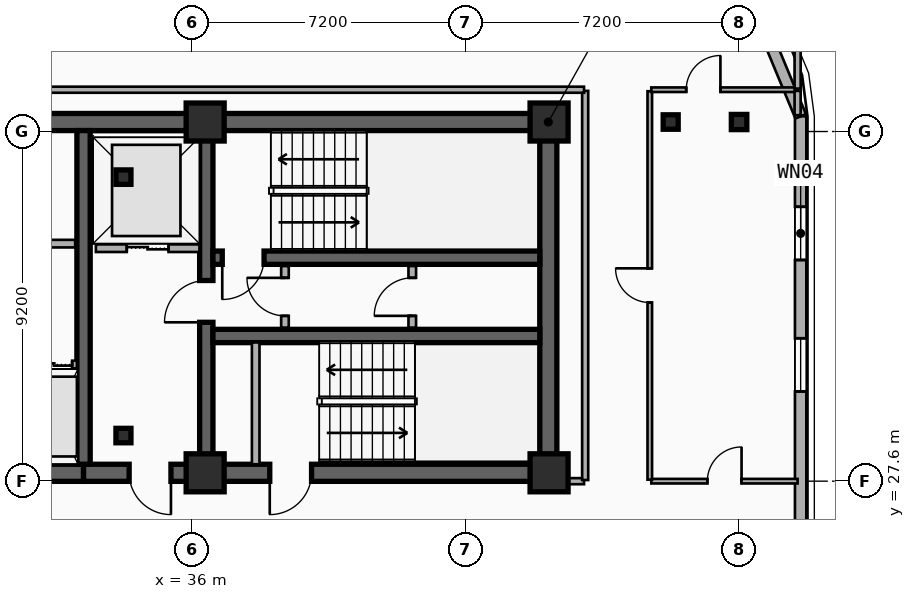
"""IFC4 building model, lengths in metres.
Left out: names, types, materials, properties, quantities, classifications, styles, units other than length and angle.
Written with IfcOpenShell. Run it as: python <this file> out.ifc"""

import sys

from ifc_helpers import new_model, si_unit, direction, frame, frame_2d, origin, origin_2d, place, context, subcontext, project, spatial, rectangle, i_section, extrude, element, fill, save


model = new_model("IFC4")
c1 = context("Model", 3, precision=1e-05, world=origin(), true_north=direction((0.0, 1.0)))
c2 = subcontext(c1, "Body", "Model", "MODEL_VIEW")
j1 = project(units=[si_unit("LENGTHUNIT", "METRE"), si_unit("PLANEANGLEUNIT", "RADIAN")], contexts=[c1])
p1 = place(None, origin())
s1 = spatial("IfcSite", under=j1, at=p1, CompositionType="ELEMENT")
p2 = place(p1, origin())
s2 = spatial("IfcBuilding", under=s1, at=p2, CompositionType="ELEMENT")
p3 = place(p2, frame((0.0, 0.0, 240.0)))
s3 = spatial("IfcBuildingStorey", under=s2, at=p3, CompositionType="ELEMENT", Elevation=240.0)
p4 = place(p3, frame((12.15, 37.05, 0.0), z_axis=(0.0, 0.0, 1.0), x_axis=(1.0, 0.0, 0.0)))
e1 = element("IfcWall", 1, at=p4, inside=s3, PredefinedType="SHEAR", context=c2, shape_type="SweptSolid", body=[
    extrude(rectangle(XDim=33.23, YDim=0.45, at=frame_2d((16.615, 0.0))), origin(), (0.0, 0.0, 1.0), 3.6),
])
p5 = place(p3, frame((33.15, 27.82, 0.0), z_axis=(0.0, 0.0, 1.0), x_axis=(-1.0, 0.0, 0.0)))
e2 = element("IfcWall", 2, at=p5, inside=s3, PredefinedType="SHEAR", context=c2, shape_type="SweptSolid", body=[
    extrude(rectangle(XDim=11.97, YDim=0.45, at=frame_2d((5.985, 0.0))), origin(), (0.0, 0.0, 1.0), 3.6),
])
p6 = place(p5, frame((6.1, 0.0, 0.0)))
e3 = element("IfcOpeningElement", 3, at=p6, cuts=e2, PredefinedType="OPENING", context=c2, shape_type="SweptSolid", body=[
    extrude(rectangle(XDim=1.6, YDim=2.2, at=frame_2d((0.8, 1.1))), frame((0.0, 0.235, 0.0), z_axis=(0.0, -1.0, 0.0), x_axis=(1.0, 0.0, 0.0)), (0.0, 0.0, 1.0), 0.47),
])
p7 = place(p3, frame((45.38, 27.82, 0.0), z_axis=(0.0, 0.0, 1.0), x_axis=(-1.0, 0.0, 0.0)))
e4 = element("IfcWall", 4, at=p7, inside=s3, PredefinedType="SHEAR", context=c2, shape_type="SweptSolid", body=[
    extrude(rectangle(XDim=12.23, YDim=0.45, at=frame_2d((6.115, 0.0))), origin(), (0.0, 0.0, 1.0), 3.6),
])
p8 = place(p7, frame((9.93, 0.0, 0.0)))
e5 = element("IfcOpeningElement", 5, at=p8, cuts=e4, PredefinedType="OPENING", context=c2, shape_type="SweptSolid", body=[
    extrude(rectangle(XDim=1.1, YDim=2.15, at=frame_2d((0.55, 1.075))), frame((0.0, 0.235, 0.0), z_axis=(0.0, -1.0, 0.0), x_axis=(1.0, 0.0, 0.0)), (0.0, 0.0, 1.0), 0.47),
])
p9 = place(p7, frame((6.23, 0.0, 0.0)))
e6 = element("IfcOpeningElement", 6, at=p9, cuts=e4, PredefinedType="OPENING", context=c2, shape_type="SweptSolid", body=[
    extrude(rectangle(XDim=1.1, YDim=2.15, at=frame_2d((0.55, 1.075))), frame((0.0, 0.235, 0.0), z_axis=(0.0, -1.0, 0.0), x_axis=(1.0, 0.0, 0.0)), (0.0, 0.0, 1.0), 0.47),
])
p10 = place(p3, frame((45.38, 28.045, 0.0), z_axis=(0.0, 0.0, 1.0), x_axis=(0.0, 1.0, 0.0)))
e7 = element("IfcWall", 7, at=p10, inside=s3, PredefinedType="SHEAR", context=c2, shape_type="SweptSolid", body=[
    extrude(rectangle(XDim=8.78, YDim=0.45, at=frame_2d((4.39, 0.0))), origin(), (0.0, 0.0, 1.0), 3.6),
])
p11 = place(p3, frame((33.15, 28.045, 0.0), z_axis=(0.0, 0.0, 1.0), x_axis=(0.0, 1.0, 0.0)))
e8 = element("IfcWall", 8, at=p11, inside=s3, PredefinedType="SHEAR", context=c2, shape_type="SweptSolid", body=[
    extrude(rectangle(XDim=8.78, YDim=0.35, at=frame_2d((4.39, 0.0))), origin(), (0.0, 0.0, 1.0), 3.6),
])
p12 = place(p3, frame((36.38, 28.045, 0.0), z_axis=(0.0, 0.0, 1.0), x_axis=(0.0, 1.0, 0.0)))
e9 = element("IfcWall", 9, at=p12, inside=s3, PredefinedType="SHEAR", context=c2, shape_type="SweptSolid", body=[
    extrude(rectangle(XDim=8.78, YDim=0.35, at=frame_2d((4.39, 0.0))), origin(), (0.0, 0.0, 1.0), 3.6),
])
p13 = place(p12, frame((3.735, 0.0, 0.0)))
e10 = element("IfcOpeningElement", 10, at=p13, cuts=e9, PredefinedType="OPENING", context=c2, shape_type="SweptSolid", body=[
    extrude(rectangle(XDim=1.1, YDim=2.15, at=frame_2d((0.55, 1.075))), frame((0.0, 0.185, 0.0), z_axis=(0.0, -1.0, 0.0), x_axis=(1.0, 0.0, 0.0)), (0.0, 0.0, 1.0), 0.37),
])
p14 = place(p3, frame((45.155, 33.48, 0.0), z_axis=(0.0, 0.0, 1.0), x_axis=(-1.0, 0.0, 0.0)))
e11 = element("IfcWall", 11, at=p14, inside=s3, PredefinedType="SHEAR", context=c2, shape_type="SweptSolid", body=[
    extrude(rectangle(XDim=8.6, YDim=0.35, at=frame_2d((4.3, 0.0))), origin(), (0.0, 0.0, 1.0), 3.6),
])
p15 = place(p14, frame((7.255, 0.0, 0.0)))
e12 = element("IfcOpeningElement", 12, at=p15, cuts=e11, PredefinedType="OPENING", context=c2, shape_type="SweptSolid", body=[
    extrude(rectangle(XDim=1.1, YDim=2.15, at=frame_2d((0.55, 1.075))), frame((0.0, 0.185, 0.0), z_axis=(0.0, -1.0, 0.0), x_axis=(1.0, 0.0, 0.0)), (0.0, 0.0, 1.0), 0.37),
])
p16 = place(p3, frame((36.555, 31.42, 0.0), z_axis=(0.0, 0.0, 1.0), x_axis=(1.0, 0.0, 0.0)))
e13 = element("IfcWall", 13, at=p16, inside=s3, PredefinedType="SHEAR", context=c2, shape_type="SweptSolid", body=[
    extrude(rectangle(XDim=8.6, YDim=0.35, at=frame_2d((4.3, 0.0))), origin(), (0.0, 0.0, 1.0), 3.6),
])
for number, where, z_axis, x_axis in (
    (14, (34.2, 28.8, 0.0), (0.0, 0.0, 1.0), (1.0, 0.0, 0.0)),
    (15, (34.2, 35.6, 0.0), (0.0, 0.0, 1.0), (1.0, 0.0, 0.0)),
):
    element("IfcColumn", number, at=place(p3, frame(where, z_axis=z_axis, x_axis=x_axis)), inside=s3, PredefinedType="COLUMN", context=c2, shape_type="SweptSolid", body=[
        extrude(i_section(OverallWidth=0.395, OverallDepth=0.38, WebThickness=0.019, FlangeThickness=0.03, FilletRadius=0.015, at=origin_2d()), origin(), (0.0, 0.0, 1.0), 3.6),
    ])
for number, where, z_axis, x_axis in (
    (16, (36.35, 27.82, 0.0), (0.0, 0.0, 1.0), (1.0, 0.0, 0.0)),
    (17, (36.35, 37.05, 0.0), (0.0, 0.0, 1.0), (1.0, 0.0, 0.0)),
    (18, (45.4, 27.82, 0.0), (0.0, 0.0, 1.0), (1.0, 0.0, 0.0)),
    (19, (45.4, 37.05, 0.0), (0.0, 0.0, 1.0), (1.0, 0.0, 0.0)),
):
    element("IfcColumn", number, at=place(p3, frame(where, z_axis=z_axis, x_axis=x_axis)), inside=s3, PredefinedType="COLUMN", context=c2, shape_type="SweptSolid", body=[
        extrude(rectangle(XDim=1.0, YDim=1.0, at=origin_2d()), origin(), (0.0, 0.0, 1.0), 3.6),
    ])
p17 = place(p3, frame((48.6, 37.05, 0.0), z_axis=(0.0, 0.0, 1.0), x_axis=(1.0, 0.0, 0.0)))
e20 = element("IfcColumn", 20, at=p17, inside=s3, PredefinedType="COLUMN", context=c2, shape_type="SweptSolid", body=[
    extrude(i_section(OverallWidth=0.395, OverallDepth=0.38, WebThickness=0.019, FlangeThickness=0.03, FilletRadius=0.015, at=origin_2d()), origin(), (0.0, 0.0, 1.0), 3.6),
])
p18 = place(p3, frame((50.4, 37.05, 0.0), z_axis=(0.0, 0.0, 1.0), x_axis=(1.0, 0.0, 0.0)))
e21 = element("IfcColumn", 21, at=p18, inside=s3, PredefinedType="COLUMN", context=c2, shape_type="SweptSolid", body=[
    extrude(i_section(OverallWidth=0.408, OverallDepth=0.4, WebThickness=0.025, FlangeThickness=0.039, FilletRadius=0.015, at=origin_2d()), origin(), (0.0, 0.0, 1.0), 3.6),
])
p19 = place(p3, frame((52.02, 37.2, 0.0), z_axis=(0.0, 0.0, 1.0), x_axis=(0.0, -1.0, 0.0)))
e22 = element("IfcWall", 22, at=p19, inside=s3, PredefinedType="SOLIDWALL", context=c2, shape_type="SweptSolid", body=[
    extrude(rectangle(XDim=28.6, YDim=0.3, at=frame_2d((14.3, 0.0))), origin(), (0.0, 0.0, 1.0), 3.28),
])
p20 = place(p19, frame((2.38, 0.0, 0.34)))
e23 = element("IfcOpeningElement", 23, at=p20, cuts=e22, PredefinedType="OPENING", context=c2, shape_type="SweptSolid", body=[
    extrude(rectangle(XDim=1.4, YDim=2.1, at=frame_2d((0.7, 1.05))), frame((0.0, 0.16, 0.0), z_axis=(0.0, -1.0, 0.0), x_axis=(1.0, 0.0, 0.0)), (0.0, 0.0, 1.0), 0.32),
])
p21 = place(p19, frame((5.84, 0.0, 0.34)))
e24 = element("IfcOpeningElement", 24, at=p21, cuts=e22, PredefinedType="OPENING", context=c2, shape_type="SweptSolid", body=[
    extrude(rectangle(XDim=1.4, YDim=2.1, at=frame_2d((0.7, 1.05))), frame((0.0, 0.16, 0.0), z_axis=(0.0, -1.0, 0.0), x_axis=(1.0, 0.0, 0.0)), (0.0, 0.0, 1.0), 0.32),
])
p22 = place(p19, frame((24.529, 0.0, 0.34)))
e25 = element("IfcOpeningElement", 25, at=p22, cuts=e22, PredefinedType="OPENING", context=c2, shape_type="SweptSolid", body=[
    extrude(rectangle(XDim=1.4, YDim=2.1, at=frame_2d((0.7, 1.05))), frame((0.0, 0.16, 0.0), z_axis=(0.0, -1.0, 0.0), x_axis=(1.0, 0.0, 0.0)), (0.0, 0.0, 1.0), 0.32),
])
p23 = place(p19, frame((20.521, 0.0, 0.34)))
e26 = element("IfcOpeningElement", 26, at=p23, cuts=e22, PredefinedType="OPENING", context=c2, shape_type="SweptSolid", body=[
    extrude(rectangle(XDim=1.4, YDim=2.1, at=frame_2d((0.7, 1.05))), frame((0.0, 0.16, 0.0), z_axis=(0.0, -1.0, 0.0), x_axis=(1.0, 0.0, 0.0)), (0.0, 0.0, 1.0), 0.32),
])
p24 = place(p19, frame((16.733, 0.0, 0.34)))
e27 = element("IfcOpeningElement", 27, at=p24, cuts=e22, PredefinedType="OPENING", context=c2, shape_type="SweptSolid", body=[
    extrude(rectangle(XDim=1.4, YDim=2.1, at=frame_2d((0.7, 1.05))), frame((0.0, 0.16, 0.0), z_axis=(0.0, -1.0, 0.0), x_axis=(1.0, 0.0, 0.0)), (0.0, 0.0, 1.0), 0.32),
])
p25 = place(p19, frame((12.945, 0.0, 0.34)))
e28 = element("IfcOpeningElement", 28, at=p25, cuts=e22, PredefinedType="OPENING", context=c2, shape_type="SweptSolid", body=[
    extrude(rectangle(XDim=1.4, YDim=2.1, at=frame_2d((0.7, 1.05))), frame((0.0, 0.16, 0.0), z_axis=(0.0, -1.0, 0.0), x_axis=(1.0, 0.0, 0.0)), (0.0, 0.0, 1.0), 0.32),
])
p26 = place(p3, frame((50.843, 40.042, 0.0), z_axis=(0.0, 0.0, 1.0), x_axis=(0.382704529509, -0.923870793506, 0.0)))
e29 = element("IfcWall", 29, at=p26, inside=s3, PredefinedType="SOLIDWALL", context=c2, shape_type="SweptSolid", body=[
    extrude(rectangle(XDim=3.077, YDim=0.3, at=frame_2d((1.538, 0.0))), origin(), (0.0, 0.0, 1.0), 3.28),
])
p27 = place(p3, frame((33.475, 33.73, 0.0), z_axis=(0.0, 0.0, 1.0), x_axis=(1.0, 0.0, 0.0)))
e30 = element("IfcWall", 30, at=p27, inside=s3, PredefinedType="PARTITIONING", context=c2, shape_type="SweptSolid", body=[
    extrude(rectangle(XDim=2.725, YDim=0.2, at=frame_2d((1.362, 0.0))), origin(), (0.0, 0.0, 1.0), 2.35),
])
p28 = place(p27, frame((0.812, 0.0, 0.0)))
e31 = element("IfcOpeningElement", 31, at=p28, cuts=e30, PredefinedType="OPENING", context=c2, shape_type="SweptSolid", body=[
    extrude(rectangle(XDim=1.1, YDim=2.15, at=frame_2d((0.55, 1.075))), frame((0.0, 0.11, 0.0), z_axis=(0.0, -1.0, 0.0), x_axis=(1.0, 0.0, 0.0)), (0.0, 0.0, 1.0), 0.22),
])
p29 = place(p3, frame((31.775, 30.67, 0.0), z_axis=(0.0, 0.0, 1.0), x_axis=(1.0, 0.0, 0.0)))
e32 = element("IfcWall", 32, at=p29, inside=s3, PredefinedType="PARTITIONING", context=c2, shape_type="SweptSolid", body=[
    extrude(rectangle(XDim=1.2, YDim=0.2, at=frame_2d((0.6, 0.0))), origin(), (0.0, 0.0, 1.0), 2.66),
])
p30 = place(p29, frame((0.125, 0.0, 0.0)))
e33 = element("IfcOpeningElement", 33, at=p30, cuts=e32, PredefinedType="OPENING", context=c2, shape_type="SweptSolid", body=[
    extrude(rectangle(XDim=0.95, YDim=2.15, at=frame_2d((0.475, 1.075))), frame((0.0, 0.11, 0.0), z_axis=(0.0, -1.0, 0.0), x_axis=(1.0, 0.0, 0.0)), (0.0, 0.0, 1.0), 0.22),
])
p31 = place(p3, frame((37.68, 28.045, 0.0), z_axis=(0.0, 0.0, 1.0), x_axis=(0.0, 1.0, 0.0)))
e34 = element("IfcWall", 34, at=p31, inside=s3, PredefinedType="PARTITIONING", context=c2, shape_type="SweptSolid", body=[
    extrude(rectangle(XDim=3.205, YDim=0.2, at=frame_2d((1.603, 0.0))), origin(), (0.0, 0.0, 1.0), 2.66),
])
p32 = place(p3, frame((38.45, 31.64, 0.0), z_axis=(0.0, 0.0, 1.0), x_axis=(0.0, 1.0, 0.0)))
e35 = element("IfcWall", 35, at=p32, inside=s3, PredefinedType="PARTITIONING", context=c2, shape_type="SweptSolid", body=[
    extrude(rectangle(XDim=1.62, YDim=0.2, at=frame_2d((0.81, 0.0))), origin(), (0.0, 0.0, 1.0), 3.28),
])
p33 = place(p32, frame((0.31, 0.0, 0.0)))
e36 = element("IfcOpeningElement", 36, at=p33, cuts=e35, PredefinedType="OPENING", context=c2, shape_type="SweptSolid", body=[
    extrude(rectangle(XDim=1.0, YDim=2.15, at=frame_2d((0.5, 1.075))), frame((0.0, 0.11, 0.0), z_axis=(0.0, -1.0, 0.0), x_axis=(1.0, 0.0, 0.0)), (0.0, 0.0, 1.0), 0.22),
])
p34 = place(p3, frame((41.8, 31.64, 0.0), z_axis=(0.0, 0.0, 1.0), x_axis=(0.0, 1.0, 0.0)))
e37 = element("IfcWall", 37, at=p34, inside=s3, PredefinedType="PARTITIONING", context=c2, shape_type="SweptSolid", body=[
    extrude(rectangle(XDim=1.62, YDim=0.2, at=frame_2d((0.81, 0.0))), origin(), (0.0, 0.0, 1.0), 3.28),
])
p35 = place(p34, frame((0.31, 0.0, 0.0)))
e38 = element("IfcOpeningElement", 38, at=p35, cuts=e37, PredefinedType="OPENING", context=c2, shape_type="SweptSolid", body=[
    extrude(rectangle(XDim=1.0, YDim=2.15, at=frame_2d((0.5, 1.075))), frame((0.0, 0.11, 0.0), z_axis=(0.0, -1.0, 0.0), x_axis=(1.0, 0.0, 0.0)), (0.0, 0.0, 1.0), 0.22),
])
p36 = place(p3, frame((27.24, 33.85, 0.0), z_axis=(0.0, 0.0, 1.0), x_axis=(1.0, 0.0, 0.0)))
e39 = element("IfcWall", 39, at=p36, inside=s3, PredefinedType="PARTITIONING", context=c2, shape_type="SweptSolid", body=[
    extrude(rectangle(XDim=5.69, YDim=0.2, at=frame_2d((2.845, 0.0))), origin(), (0.0, 0.0, 1.0), 2.35),
])
p37 = place(p36, frame((2.245, 0.0, 0.0)))
e40 = element("IfcOpeningElement", 40, at=p37, cuts=e39, PredefinedType="OPENING", context=c2, shape_type="SweptSolid", body=[
    extrude(rectangle(XDim=1.2, YDim=2.15, at=frame_2d((0.6, 1.075))), frame((0.0, 0.11, 0.0), z_axis=(0.0, -1.0, 0.0), x_axis=(1.0, 0.0, 0.0)), (0.0, 0.0, 1.0), 0.22),
])
p38 = place(p3, frame((48.09, 27.6, 0.0), z_axis=(0.0, 0.0, 1.0), x_axis=(1.0, 0.0, 0.0)))
e41 = element("IfcWall", 41, at=p38, inside=s3, PredefinedType="PARTITIONING", context=c2, shape_type="SweptSolid", body=[
    extrude(rectangle(XDim=3.85, YDim=0.12, at=frame_2d((1.925, 0.0))), origin(), (0.0, 0.0, 1.0), 2.61),
])
p39 = place(p38, frame((1.475, 0.0, 0.0)))
e42 = element("IfcOpeningElement", 42, at=p39, cuts=e41, PredefinedType="OPENING", context=c2, shape_type="SweptSolid", body=[
    extrude(rectangle(XDim=0.9, YDim=2.1, at=frame_2d((0.45, 1.05))), frame((0.0, 0.07, 0.0), z_axis=(0.0, -1.0, 0.0), x_axis=(1.0, 0.0, 0.0)), (0.0, 0.0, 1.0), 0.14),
])
p40 = place(p3, frame((48.05, 27.64, 0.0), z_axis=(0.0, 0.0, 1.0), x_axis=(0.0, 1.0, 0.0)))
e43 = element("IfcWall", 43, at=p40, inside=s3, PredefinedType="PARTITIONING", context=c2, shape_type="SweptSolid", body=[
    extrude(rectangle(XDim=10.22, YDim=0.12, at=frame_2d((5.11, 0.0))), origin(), (0.0, 0.0, 1.0), 2.76),
])
p41 = place(p40, frame((4.66, 0.0, 0.0)))
e44 = element("IfcOpeningElement", 44, at=p41, cuts=e43, PredefinedType="OPENING", context=c2, shape_type="SweptSolid", body=[
    extrude(rectangle(XDim=0.9, YDim=2.1, at=frame_2d((0.45, 1.05))), frame((0.0, 0.07, 0.0), z_axis=(0.0, -1.0, 0.0), x_axis=(1.0, 0.0, 0.0)), (0.0, 0.0, 1.0), 0.14),
])
p42 = place(p3, frame((48.09, 37.9, 0.0), z_axis=(0.0, 0.0, 1.0), x_axis=(1.0, 0.0, 0.0)))
e45 = element("IfcWall", 45, at=p42, inside=s3, PredefinedType="PARTITIONING", context=c2, shape_type="SweptSolid", body=[
    extrude(rectangle(XDim=3.85, YDim=0.12, at=frame_2d((1.925, 0.0))), origin(), (0.0, 0.0, 1.0), 3.28),
])
p43 = place(p42, frame((0.919, 0.0, 0.0)))
e46 = element("IfcOpeningElement", 46, at=p43, cuts=e45, PredefinedType="OPENING", context=c2, shape_type="SweptSolid", body=[
    extrude(rectangle(XDim=0.9, YDim=2.1, at=frame_2d((0.45, 1.05))), frame((0.0, 0.07, 0.0), z_axis=(0.0, -1.0, 0.0), x_axis=(1.0, 0.0, 0.0)), (0.0, 0.0, 1.0), 0.14),
])
p44 = place(p3, frame((45.41, 27.6, 0.0), z_axis=(0.0, 0.0, 1.0), x_axis=(1.0, 0.0, 0.0)))
e47 = element("IfcWall", 47, at=p44, inside=s3, PredefinedType="PARTITIONING", context=c2, shape_type="SweptSolid", body=[
    extrude(rectangle(XDim=0.91, YDim=0.16, at=frame_2d((0.455, 0.0))), origin(), (0.0, 0.0, 1.0), 2.35),
])
p45 = place(p3, frame((46.35, 27.63, 0.0), z_axis=(0.0, 0.0, 1.0), x_axis=(0.0, 1.0, 0.0)))
e48 = element("IfcWall", 48, at=p45, inside=s3, PredefinedType="PARTITIONING", context=c2, shape_type="SweptSolid", body=[
    extrude(rectangle(XDim=10.24, YDim=0.16, at=frame_2d((5.12, 0.0))), origin(), (0.0, 0.0, 1.0), 2.76),
])
p46 = place(p3, frame((11.28, 37.9, 0.0), z_axis=(0.0, 0.0, 1.0), x_axis=(1.0, 0.0, 0.0)))
e49 = element("IfcWall", 49, at=p46, inside=s3, PredefinedType="PARTITIONING", context=c2, shape_type="SweptSolid", body=[
    extrude(rectangle(XDim=35.04, YDim=0.16, at=frame_2d((17.52, 0.0))), origin(), (0.0, 0.0, 1.0), 3.28),
])
p47 = place(p3, frame((51.94, 37.93, 0.0), z_axis=(0.0, 0.0, 1.0), x_axis=(0.0, 1.0, 0.0)))
e50 = element("IfcWall", 50, at=p47, inside=s3, PredefinedType="PARTITIONING", context=c2, shape_type="SweptSolid", body=[
    extrude(rectangle(XDim=1.44, YDim=0.16, at=frame_2d((0.72, 0.0))), origin(), (0.0, 0.0, 1.0), 3.28),
])
p48 = place(p3, frame((51.94, 37.23, 0.0), z_axis=(0.0, 0.0, 1.0), x_axis=(0.0, 1.0, 0.0)))
e51 = element("IfcWall", 51, at=p48, inside=s3, PredefinedType="PARTITIONING", context=c2, shape_type="SweptSolid", body=[
    extrude(rectangle(XDim=0.64, YDim=0.16, at=frame_2d((0.32, 0.0))), origin(), (0.0, 0.0, 1.0), 3.28),
])
p49 = place(p20, origin())
e52 = element("IfcWindow", 52, at=p49, inside=s3, PartitioningType="SINGLE_PANEL", PredefinedType="WINDOW", context=c2, shape_type="SweptSolid", body=[
    extrude(rectangle(XDim=1.4, YDim=2.1, at=frame_2d((0.7, 1.05))), frame((0.0, 0.03, 0.0), z_axis=(0.0, -1.0, 0.0), x_axis=(1.0, 0.0, 0.0)), (0.0, 0.0, 1.0), 0.06),
])
fill(e23, e52)
p50 = place(p21, origin())
e53 = element("IfcWindow", 53, at=p50, inside=s3, PartitioningType="SINGLE_PANEL", PredefinedType="WINDOW", context=c2, shape_type="SweptSolid", body=[
    extrude(rectangle(XDim=1.4, YDim=2.1, at=frame_2d((0.7, 1.05))), frame((0.0, 0.03, 0.0), z_axis=(0.0, -1.0, 0.0), x_axis=(1.0, 0.0, 0.0)), (0.0, 0.0, 1.0), 0.06),
])
fill(e24, e53)
p51 = place(p28, origin())
e54 = element("IfcDoor", 54, at=p51, inside=s3, OperationType="DOUBLE_DOOR_SLIDING", PredefinedType="DOOR", context=c2, shape_type="SweptSolid", body=[
    extrude(rectangle(XDim=1.1, YDim=2.15, at=frame_2d((0.55, 1.075))), frame((0.0, 0.025, 0.0), z_axis=(0.0, -1.0, 0.0), x_axis=(1.0, 0.0, 0.0)), (0.0, 0.0, 1.0), 0.05),
])
fill(e31, e54)
p52 = place(p30, origin())
e55 = element("IfcDoor", 55, at=p52, inside=s3, OperationType="DOUBLE_DOOR_SLIDING", PredefinedType="DOOR", context=c2, shape_type="SweptSolid", body=[
    extrude(rectangle(XDim=0.95, YDim=2.15, at=frame_2d((0.475, 1.075))), frame((0.0, 0.025, 0.0), z_axis=(0.0, -1.0, 0.0), x_axis=(1.0, 0.0, 0.0)), (0.0, 0.0, 1.0), 0.05),
])
fill(e33, e55)
p53 = place(p15, origin())
e56 = element("IfcDoor", 56, at=p53, inside=s3, OperationType="SINGLE_SWING_RIGHT", PredefinedType="DOOR", context=c2, shape_type="SweptSolid", body=[
    extrude(rectangle(XDim=1.1, YDim=2.15, at=frame_2d((0.55, 1.075))), frame((0.0, 0.025, 0.0), z_axis=(0.0, -1.0, 0.0), x_axis=(1.0, 0.0, 0.0)), (0.0, 0.0, 1.0), 0.05),
])
fill(e12, e56)
p54 = place(p13, origin())
e57 = element("IfcDoor", 57, at=p54, inside=s3, OperationType="SINGLE_SWING_LEFT", PredefinedType="DOOR", context=c2, shape_type="SweptSolid", body=[
    extrude(rectangle(XDim=1.1, YDim=2.15, at=frame_2d((0.55, 1.075))), frame((0.0, 0.025, 0.0), z_axis=(0.0, -1.0, 0.0), x_axis=(1.0, 0.0, 0.0)), (0.0, 0.0, 1.0), 0.05),
])
fill(e10, e57)
p55 = place(p8, origin())
e58 = element("IfcDoor", 58, at=p55, inside=s3, OperationType="SINGLE_SWING_LEFT", PredefinedType="DOOR", context=c2, shape_type="SweptSolid", body=[
    extrude(rectangle(XDim=1.1, YDim=2.15, at=frame_2d((0.55, 1.075))), frame((0.0, 0.025, 0.0), z_axis=(0.0, -1.0, 0.0), x_axis=(1.0, 0.0, 0.0)), (0.0, 0.0, 1.0), 0.05),
])
fill(e5, e58)
p56 = place(p9, origin())
e59 = element("IfcDoor", 59, at=p56, inside=s3, OperationType="SINGLE_SWING_RIGHT", PredefinedType="DOOR", context=c2, shape_type="SweptSolid", body=[
    extrude(rectangle(XDim=1.1, YDim=2.15, at=frame_2d((0.55, 1.075))), frame((0.0, 0.025, 0.0), z_axis=(0.0, -1.0, 0.0), x_axis=(1.0, 0.0, 0.0)), (0.0, 0.0, 1.0), 0.05),
])
fill(e6, e59)
p57 = place(p33, origin())
e60 = element("IfcDoor", 60, at=p57, inside=s3, OperationType="SINGLE_SWING_RIGHT", PredefinedType="DOOR", context=c2, shape_type="SweptSolid", body=[
    extrude(rectangle(XDim=1.0, YDim=2.15, at=frame_2d((0.5, 1.075))), frame((0.0, 0.025, 0.0), z_axis=(0.0, -1.0, 0.0), x_axis=(1.0, 0.0, 0.0)), (0.0, 0.0, 1.0), 0.05),
])
fill(e36, e60)
p58 = place(p35, origin())
e61 = element("IfcDoor", 61, at=p58, inside=s3, OperationType="SINGLE_SWING_LEFT", PredefinedType="DOOR", context=c2, shape_type="SweptSolid", body=[
    extrude(rectangle(XDim=1.0, YDim=2.15, at=frame_2d((0.5, 1.075))), frame((0.0, 0.025, 0.0), z_axis=(0.0, -1.0, 0.0), x_axis=(1.0, 0.0, 0.0)), (0.0, 0.0, 1.0), 0.05),
])
fill(e38, e61)
p59 = place(p39, origin())
e62 = element("IfcDoor", 62, at=p59, inside=s3, OperationType="SINGLE_SWING_RIGHT", PredefinedType="DOOR", context=c2, shape_type="SweptSolid", body=[
    extrude(rectangle(XDim=0.9, YDim=2.1, at=frame_2d((0.45, 1.05))), frame((0.0, 0.025, 0.0), z_axis=(0.0, -1.0, 0.0), x_axis=(1.0, 0.0, 0.0)), (0.0, 0.0, 1.0), 0.05),
])
fill(e42, e62)
p60 = place(p41, origin())
e63 = element("IfcDoor", 63, at=p60, inside=s3, OperationType="SINGLE_SWING_RIGHT", PredefinedType="DOOR", context=c2, shape_type="SweptSolid", body=[
    extrude(rectangle(XDim=0.9, YDim=2.1, at=frame_2d((0.45, 1.05))), frame((0.0, 0.025, 0.0), z_axis=(0.0, -1.0, 0.0), x_axis=(1.0, 0.0, 0.0)), (0.0, 0.0, 1.0), 0.05),
])
fill(e44, e63)
p61 = place(p43, origin())
e64 = element("IfcDoor", 64, at=p61, inside=s3, OperationType="SINGLE_SWING_RIGHT", PredefinedType="DOOR", context=c2, shape_type="SweptSolid", body=[
    extrude(rectangle(XDim=0.9, YDim=2.1, at=frame_2d((0.45, 1.05))), frame((0.0, 0.025, 0.0), z_axis=(0.0, -1.0, 0.0), x_axis=(1.0, 0.0, 0.0)), (0.0, 0.0, 1.0), 0.05),
])
fill(e46, e64)
save(model, sys.argv[1])
